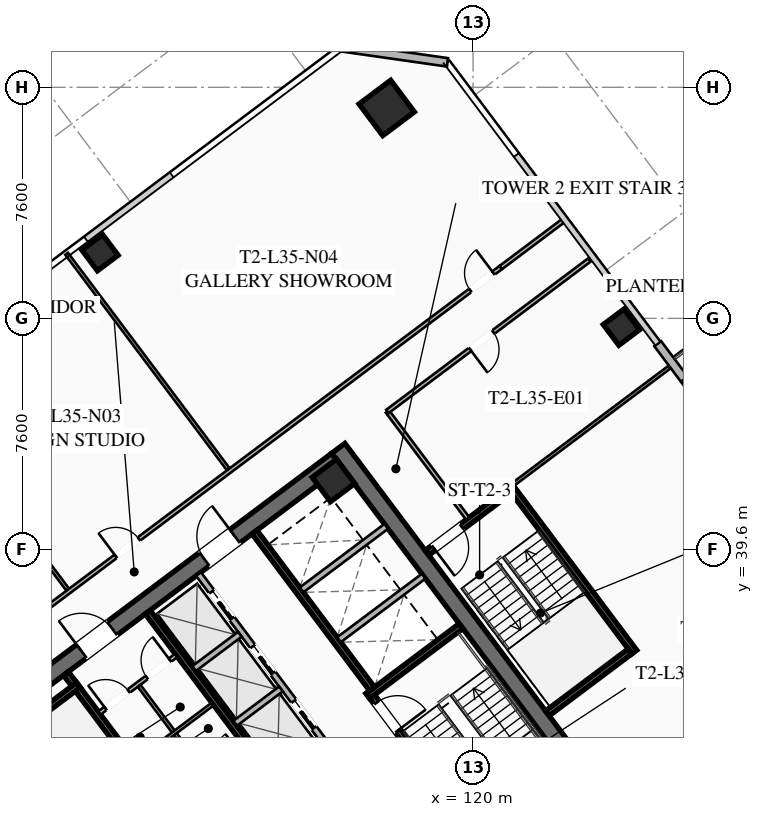
"""IFC4 building model, lengths in metres.
Left out: names, types, materials, properties, quantities, classifications, styles, units other than length and angle.
Written with IfcOpenShell. Run it as: python <this file> out.ifc"""

import sys

from ifc_helpers import new_model, si_unit, direction, frame, frame_2d, origin, origin_2d, place, context, subcontext, project, spatial, rectangle, hollow_rectangle, extrude, element, fill, save


model = new_model("IFC4")
c1 = context("Model", 3, precision=1e-05, world=origin(), true_north=direction((0.0, 1.0)))
c2 = subcontext(c1, "Body", "Model", "MODEL_VIEW")
j1 = project(units=[si_unit("LENGTHUNIT", "METRE"), si_unit("PLANEANGLEUNIT", "RADIAN")], contexts=[c1])
p1 = place(None, origin())
s1 = spatial("IfcSite", under=j1, at=p1, CompositionType="ELEMENT")
p2 = place(p1, origin())
s2 = spatial("IfcBuilding", under=s1, at=p2, CompositionType="ELEMENT")
p3 = place(p2, frame((0.0, 0.0, 132.15)))
s3 = spatial("IfcBuildingStorey", under=s2, at=p3, CompositionType="ELEMENT", Elevation=132.15)
for number, where, z_axis, x_axis in (
    (1, (112.436, 21.077, 0.0), (0.0, 0.0, 1.0), (-0.6, 0.8, 0.0)),
    (2, (115.564, 42.923, 0.0), (0.0, 0.0, 1.0), (0.6, -0.8, 0.0)),
):
    element("IfcWall", number, at=place(p3, frame(where, z_axis=z_axis, x_axis=x_axis)), inside=s3, PredefinedType="SHEAR", context=c2, shape_type="SweptSolid", body=[
        extrude(rectangle(XDim=15.6, YDim=0.55, at=frame_2d((7.8, 0.0))), origin(), (0.0, 0.0, 1.0), 3.55),
    ])
p4 = place(p3, frame((103.461, 33.502, 0.0), z_axis=(0.0, 0.0, 1.0), x_axis=(0.799998054672, 0.600002593761, 0.0)))
e3 = element("IfcWall", 3, at=p4, inside=s3, PredefinedType="SHEAR", context=c2, shape_type="SweptSolid", body=[
    extrude(rectangle(XDim=15.06, YDim=0.55, at=frame_2d((7.53, 0.0))), origin(), (0.0, 0.0, 1.0), 3.55),
])
p5 = place(p4, frame((4.58, 0.0, 0.0)))
e4 = element("IfcOpeningElement", 4, at=p5, cuts=e3, PredefinedType="OPENING", context=c2, shape_type="SweptSolid", body=[
    extrude(rectangle(XDim=1.25, YDim=2.25, at=frame_2d((0.625, 1.125))), frame((0.0, 0.285, 0.0), z_axis=(0.0, -1.0, 0.0), x_axis=(1.0, 0.0, 0.0)), (0.0, 0.0, 1.0), 0.57),
])
p6 = place(p4, frame((9.63, 0.0, 0.0)))
e5 = element("IfcOpeningElement", 5, at=p6, cuts=e3, PredefinedType="OPENING", context=c2, shape_type="SweptSolid", body=[
    extrude(rectangle(XDim=1.25, YDim=2.25, at=frame_2d((0.625, 1.125))), frame((0.0, 0.285, 0.0), z_axis=(0.0, -1.0, 0.0), x_axis=(1.0, 0.0, 0.0)), (0.0, 0.0, 1.0), 0.57),
])
p7 = place(p3, frame((115.41, 41.87, 0.0), z_axis=(0.0, 0.0, 1.0), x_axis=(0.799999996291, 0.600000004945, 0.0)))
e6 = element("IfcColumn", 6, at=p7, inside=s3, PredefinedType="COLUMN", context=c2, shape_type="SweptSolid", body=[
    extrude(hollow_rectangle(XDim=1.0, YDim=1.0, WallThickness=0.04, at=origin_2d()), origin(), (0.0, 0.0, 1.0), 3.37),
])
p8 = place(p3, frame((117.16, 54.12, 0.0), z_axis=(0.0, 0.0, 1.0), x_axis=(0.799999996291, 0.600000004945, 0.0)))
e7 = element("IfcColumn", 7, at=p8, inside=s3, PredefinedType="COLUMN", context=c2, shape_type="SweptSolid", body=[
    extrude(hollow_rectangle(XDim=1.3, YDim=1.3, WallThickness=0.05, at=origin_2d()), origin(), (0.0, 0.0, 1.0), 3.37),
])
for number, where, z_axis, x_axis in (
    (8, (124.88, 46.91, 0.0), (0.0, 0.0, 1.0), (0.8, 0.6, 0.0)),
    (9, (107.73, 49.36, 0.0), (0.0, 0.0, 1.0), (0.8, 0.6, 0.0)),
):
    element("IfcColumn", number, at=place(p3, frame(where, z_axis=z_axis, x_axis=x_axis)), inside=s3, PredefinedType="COLUMN", context=c2, shape_type="SweptSolid", body=[
        extrude(hollow_rectangle(XDim=0.85, YDim=0.85, WallThickness=0.035, at=origin_2d()), origin(), (0.0, 0.0, 1.0), 3.37),
    ])
p9 = place(p3, frame((126.074, 46.368, 0.0), z_axis=(0.0, 0.0, 1.0), x_axis=(0.600018382406, -0.799986212866, 0.0)))
e10 = element("IfcWall", 10, at=p9, inside=s3, PredefinedType="SOLIDWALL", context=c2, shape_type="SweptSolid", body=[
    extrude(rectangle(XDim=8.5, YDim=0.28, at=frame_2d((4.25, 0.0))), origin(), (0.0, 0.0, 1.0), 3.37),
])
p10 = place(p9, frame((3.6, 0.0, 0.0)))
e11 = element("IfcOpeningElement", 11, at=p10, cuts=e10, PredefinedType="OPENING", context=c2, shape_type="SweptSolid", body=[
    extrude(rectangle(XDim=1.3, YDim=2.15, at=frame_2d((0.65, 1.075))), frame((0.0, 0.15, 0.0), z_axis=(0.0, -1.0, 0.0), x_axis=(1.0, 0.0, 0.0)), (0.0, 0.0, 1.0), 0.3),
])
p11 = place(p9, frame((1.46, 0.0, 0.85)))
e12 = element("IfcOpeningElement", 12, at=p11, cuts=e10, PredefinedType="OPENING", context=c2, shape_type="SweptSolid", body=[
    extrude(rectangle(XDim=1.8, YDim=1.92, at=frame_2d((0.9, 0.96))), frame((0.0, 0.15, 0.0), z_axis=(0.0, -1.0, 0.0), x_axis=(1.0, 0.0, 0.0)), (0.0, 0.0, 1.0), 0.3),
])
p12 = place(p3, frame((115.66, 56.12, 0.0), z_axis=(0.0, 0.0, 1.0), x_axis=(0.989949493661, -0.141421356237, 0.0)))
e13 = element("IfcWall", 13, at=p12, inside=s3, PredefinedType="SOLIDWALL", context=c2, shape_type="SweptSolid", body=[
    extrude(rectangle(XDim=3.536, YDim=0.28, at=frame_2d((1.768, 0.0))), origin(), (0.0, 0.0, 1.0), 3.37),
])
p13 = place(p3, frame((111.44, 29.08, 0.0), z_axis=(0.0, 0.0, 1.0), x_axis=(-0.59999029481, 0.8000072788, 0.0)))
e14 = element("IfcWall", 14, at=p13, inside=s3, PredefinedType="SHEAR", context=c2, shape_type="SweptSolid", body=[
    extrude(rectangle(XDim=8.05, YDim=0.2, at=frame_2d((4.025, 0.0))), origin(), (0.0, 0.0, 1.0), 3.37),
])
p14 = place(p13, frame((0.45, 0.0, 0.0)))
e15 = element("IfcOpeningElement", 15, at=p14, cuts=e14, PredefinedType="OPENING", context=c2, shape_type="SweptSolid", body=[
    extrude(rectangle(XDim=1.15, YDim=2.2, at=frame_2d((0.575, 1.1))), frame((0.0, 0.11, 0.0), z_axis=(0.0, -1.0, 0.0), x_axis=(1.0, 0.0, 0.0)), (0.0, 0.0, 1.0), 0.22),
])
p15 = place(p3, frame((103.956, 32.842, 0.0), z_axis=(0.0, 0.0, 1.0), x_axis=(0.800015298837, 0.599979601008, 0.0)))
e16 = element("IfcWall", 16, at=p15, inside=s3, PredefinedType="SHEAR", context=c2, shape_type="SweptSolid", body=[
    extrude(rectangle(XDim=3.83, YDim=0.2, at=frame_2d((1.915, 0.0))), origin(), (0.0, 0.0, 1.0), 3.37),
])
p16 = place(p3, frame((116.56, 34.92, 0.0), z_axis=(0.0, 0.0, 1.0), x_axis=(0.59999029481, -0.8000072788, 0.0)))
e17 = element("IfcWall", 17, at=p16, inside=s3, PredefinedType="SHEAR", context=c2, shape_type="SweptSolid", body=[
    extrude(rectangle(XDim=8.05, YDim=0.2, at=frame_2d((4.025, 0.0))), origin(), (0.0, 0.0, 1.0), 3.37),
])
p17 = place(p16, frame((0.45, 0.0, 0.0)))
e18 = element("IfcOpeningElement", 18, at=p17, cuts=e17, PredefinedType="OPENING", context=c2, shape_type="SweptSolid", body=[
    extrude(rectangle(XDim=1.15, YDim=2.2, at=frame_2d((0.575, 1.1))), frame((0.0, 0.11, 0.0), z_axis=(0.0, -1.0, 0.0), x_axis=(1.0, 0.0, 0.0)), (0.0, 0.0, 1.0), 0.22),
])
p18 = place(p3, frame((116.54, 34.78, 0.0), z_axis=(0.0, 0.0, 1.0), x_axis=(0.800015298837, 0.599979601008, 0.0)))
e19 = element("IfcWall", 19, at=p18, inside=s3, PredefinedType="SHEAR", context=c2, shape_type="SweptSolid", body=[
    extrude(rectangle(XDim=3.83, YDim=0.2, at=frame_2d((1.915, 0.0))), origin(), (0.0, 0.0, 1.0), 3.37),
])
p19 = place(p3, frame((117.998, 25.936, 0.0), z_axis=(0.0, 0.0, 1.0), x_axis=(-0.600002693989, 0.799997979501, 0.0)))
e20 = element("IfcWall", 20, at=p19, inside=s3, PredefinedType="SHEAR", context=c2, shape_type="SweptSolid", body=[
    extrude(rectangle(XDim=14.5, YDim=0.2, at=frame_2d((7.25, 0.0))), origin(), (0.0, 0.0, 1.0), 3.37),
])
p20 = place(p3, frame((112.81, 40.17, 0.0), z_axis=(0.0, 0.0, 1.0), x_axis=(0.599993943644, -0.800004542231, 0.0)))
e21 = element("IfcWall", 21, at=p20, inside=s3, PredefinedType="SHEAR", context=c2, shape_type="SweptSolid", body=[
    extrude(rectangle(XDim=6.45, YDim=0.2, at=frame_2d((3.225, 0.0))), origin(), (0.0, 0.0, 1.0), 3.37),
])
for number, where, z_axis, x_axis in (
    (22, (115.59, 36.63, 0.0), (0.0, 0.0, 1.0), (0.8, 0.6, 0.0)),
    (23, (114.36, 38.27, 0.0), (0.0, 0.0, 1.0), (0.8, 0.6, 0.0)),
):
    element("IfcWall", number, at=place(p3, frame(where, z_axis=z_axis, x_axis=x_axis)), inside=s3, PredefinedType="SOLIDWALL", context=c2, shape_type="SweptSolid", body=[
        extrude(rectangle(XDim=3.48, YDim=0.2, at=frame_2d((1.74, 0.0))), origin(), (0.0, 0.0, 1.0), 3.37),
    ])
p21 = place(p3, frame((107.71, 34.22, 0.0), z_axis=(0.0, 0.0, 1.0), x_axis=(0.799981399002, 0.60002480053, 0.0)))
e24 = element("IfcWall", 24, at=p21, inside=s3, PredefinedType="PARTITIONING", context=c2, shape_type="SweptSolid", body=[
    extrude(rectangle(XDim=3.15, YDim=0.135, at=frame_2d((1.575, 0.0))), origin(), (0.0, 0.0, 1.0), 2.723),
])
p22 = place(p21, frame((0.25, 0.0, 0.0)))
e25 = element("IfcOpeningElement", 25, at=p22, cuts=e24, PredefinedType="OPENING", context=c2, shape_type="SweptSolid", body=[
    extrude(rectangle(XDim=0.95, YDim=2.05, at=frame_2d((0.475, 1.025))), frame((0.0, 0.077, 0.0), z_axis=(0.0, -1.0, 0.0), x_axis=(1.0, 0.0, 0.0)), (0.0, 0.0, 1.0), 0.155),
])
p23 = place(p21, frame((1.95, 0.0, 0.0)))
e26 = element("IfcOpeningElement", 26, at=p23, cuts=e24, PredefinedType="OPENING", context=c2, shape_type="SweptSolid", body=[
    extrude(rectangle(XDim=0.95, YDim=2.05, at=frame_2d((0.475, 1.025))), frame((0.0, 0.077, 0.0), z_axis=(0.0, -1.0, 0.0), x_axis=(1.0, 0.0, 0.0)), (0.0, 0.0, 1.0), 0.155),
])
p24 = place(p3, frame((111.296, 32.072, 0.0), z_axis=(0.0, 0.0, 1.0), x_axis=(-0.59995887973, 0.800030838552, 0.0)))
e27 = element("IfcWall", 27, at=p24, inside=s3, PredefinedType="PARTITIONING", context=c2, shape_type="SweptSolid", body=[
    extrude(rectangle(XDim=3.8, YDim=0.11, at=frame_2d((1.9, 0.0))), origin(), (0.0, 0.0, 1.0), 2.723),
])
p25 = place(p3, frame((108.91, 32.62, 0.0), z_axis=(0.0, 0.0, 1.0), x_axis=(0.800018601094, 0.59997519774, 0.0)))
e28 = element("IfcWall", 28, at=p25, inside=s3, PredefinedType="PARTITIONING", context=c2, shape_type="SweptSolid", body=[
    extrude(rectangle(XDim=3.15, YDim=0.11, at=frame_2d((1.575, 0.0))), origin(), (0.0, 0.0, 1.0), 2.723),
])
p26 = place(p3, frame((115.11, 33.27, 0.0), z_axis=(0.0, 0.0, 1.0), x_axis=(-0.600011322243, 0.799991508192, 0.0)))
e29 = element("IfcWall", 29, at=p26, inside=s3, PredefinedType="SOLIDWALL", context=c2, shape_type="SweptSolid", body=[
    extrude(rectangle(XDim=6.9, YDim=0.2, at=frame_2d((3.45, 0.0))), origin(), (0.0, 0.0, 1.0), 3.37),
])
p27 = place(p26, frame((0.575, 0.0, 0.0)))
e30 = element("IfcOpeningElement", 30, at=p27, cuts=e29, PredefinedType="OPENING", context=c2, shape_type="SweptSolid", body=[
    extrude(rectangle(XDim=1.1, YDim=2.2, at=frame_2d((0.55, 1.1))), frame((0.0, 0.11, 0.0), z_axis=(0.0, -1.0, 0.0), x_axis=(1.0, 0.0, 0.0)), (0.0, 0.0, 1.0), 0.22),
])
p28 = place(p26, frame((2.825, 0.0, 0.0)))
e31 = element("IfcOpeningElement", 31, at=p28, cuts=e29, PredefinedType="OPENING", context=c2, shape_type="SweptSolid", body=[
    extrude(rectangle(XDim=1.1, YDim=2.2, at=frame_2d((0.55, 1.1))), frame((0.0, 0.11, 0.0), z_axis=(0.0, -1.0, 0.0), x_axis=(1.0, 0.0, 0.0)), (0.0, 0.0, 1.0), 0.22),
])
p29 = place(p26, frame((5.075, 0.0, 0.0)))
e32 = element("IfcOpeningElement", 32, at=p29, cuts=e29, PredefinedType="OPENING", context=c2, shape_type="SweptSolid", body=[
    extrude(rectangle(XDim=1.1, YDim=2.2, at=frame_2d((0.55, 1.1))), frame((0.0, 0.11, 0.0), z_axis=(0.0, -1.0, 0.0), x_axis=(1.0, 0.0, 0.0)), (0.0, 0.0, 1.0), 0.22),
])
p30 = place(p3, frame((112.176, 33.882, 0.0), z_axis=(0.0, 0.0, 1.0), x_axis=(0.8, 0.6, 0.0)))
e33 = element("IfcWall", 33, at=p30, inside=s3, PredefinedType="SOLIDWALL", context=c2, shape_type="SweptSolid", body=[
    extrude(rectangle(XDim=1.88, YDim=0.2, at=frame_2d((0.94, 0.0))), origin(), (0.0, 0.0, 1.0), 3.37),
])
p31 = place(p3, frame((110.826, 35.682, 0.0), z_axis=(0.0, 0.0, 1.0), x_axis=(0.799984418148, 0.600020775241, 0.0)))
e34 = element("IfcWall", 34, at=p31, inside=s3, PredefinedType="SOLIDWALL", context=c2, shape_type="SweptSolid", body=[
    extrude(rectangle(XDim=1.88, YDim=0.2, at=frame_2d((0.94, 0.0))), origin(), (0.0, 0.0, 1.0), 3.37),
])
p32 = place(p3, frame((125.304, 36.228, 0.0), z_axis=(0.0, 0.0, 1.0), x_axis=(-0.59998851072, 0.800008616831, 0.0)))
e35 = element("IfcWall", 35, at=p32, inside=s3, PredefinedType="SHEAR", context=c2, shape_type="SweptSolid", body=[
    extrude(rectangle(XDim=6.8, YDim=0.2, at=frame_2d((3.4, 0.0))), origin(), (0.0, 0.0, 1.0), 3.37),
])
p33 = place(p3, frame((121.204, 41.528, 0.0), z_axis=(0.0, 0.0, 1.0), x_axis=(-0.800017232136, -0.599977023131, 0.0)))
e36 = element("IfcWall", 36, at=p33, inside=s3, PredefinedType="SHEAR", context=c2, shape_type="SweptSolid", body=[
    extrude(rectangle(XDim=3.4, YDim=0.2, at=frame_2d((1.7, 0.0))), origin(), (0.0, 0.0, 1.0), 3.37),
])
p34 = place(p33, frame((1.975, 0.0, 0.0)))
e37 = element("IfcOpeningElement", 37, at=p34, cuts=e36, PredefinedType="OPENING", context=c2, shape_type="SweptSolid", body=[
    extrude(rectangle(XDim=1.15, YDim=2.2, at=frame_2d((0.575, 1.1))), frame((0.0, 0.11, 0.0), z_axis=(0.0, -1.0, 0.0), x_axis=(1.0, 0.0, 0.0)), (0.0, 0.0, 1.0), 0.22),
])
p35 = place(p3, frame((122.444, 34.208, 0.0), z_axis=(0.0, 0.0, 1.0), x_axis=(0.79999138319, 0.600011488909, 0.0)))
e38 = element("IfcWall", 38, at=p35, inside=s3, PredefinedType="SHEAR", context=c2, shape_type="SweptSolid", body=[
    extrude(rectangle(XDim=3.4, YDim=0.2, at=frame_2d((1.7, 0.0))), origin(), (0.0, 0.0, 1.0), 3.37),
])
p36 = place(p3, frame((119.824, 40.618, 0.0), z_axis=(0.0, 0.0, 1.0), x_axis=(-0.599982243973, 0.800013316712, 0.0)))
e39 = element("IfcWall", 39, at=p36, inside=s3, PredefinedType="PARTITIONING", context=c2, shape_type="SweptSolid", body=[
    extrude(rectangle(XDim=4.4, YDim=0.135, at=frame_2d((2.2, 0.0))), origin(), (0.0, 0.0, 1.0), 2.723),
])
p37 = place(p3, frame((95.87, 30.09, 0.0), z_axis=(0.0, 0.0, 1.0), x_axis=(0.799997191971, 0.600003744021, 0.0)))
e40 = element("IfcWall", 40, at=p37, inside=s3, PredefinedType="PARTITIONING", context=c2, shape_type="SweptSolid", body=[
    extrude(rectangle(XDim=31.3, YDim=0.135, at=frame_2d((15.65, 0.0))), origin(), (0.0, 0.0, 1.0), 2.723),
])
p38 = place(p37, frame((0.3, 0.0, 0.0)))
e41 = element("IfcOpeningElement", 41, at=p38, cuts=e40, PredefinedType="OPENING", context=c2, shape_type="SweptSolid", body=[
    extrude(rectangle(XDim=0.95, YDim=2.05, at=frame_2d((0.475, 1.025))), frame((0.0, 0.077, 0.0), z_axis=(0.0, -1.0, 0.0), x_axis=(1.0, 0.0, 0.0)), (0.0, 0.0, 1.0), 0.155),
])
p39 = place(p37, frame((11.202, 0.0, 0.0)))
e42 = element("IfcOpeningElement", 42, at=p39, cuts=e40, PredefinedType="OPENING", context=c2, shape_type="SweptSolid", body=[
    extrude(rectangle(XDim=0.95, YDim=2.05, at=frame_2d((0.475, 1.025))), frame((0.0, 0.077, 0.0), z_axis=(0.0, -1.0, 0.0), x_axis=(1.0, 0.0, 0.0)), (0.0, 0.0, 1.0), 0.155),
])
p40 = place(p37, frame((15.474, 0.0, 0.0)))
e43 = element("IfcOpeningElement", 43, at=p40, cuts=e40, PredefinedType="OPENING", context=c2, shape_type="SweptSolid", body=[
    extrude(rectangle(XDim=0.95, YDim=2.05, at=frame_2d((0.475, 1.025))), frame((0.0, 0.077, 0.0), z_axis=(0.0, -1.0, 0.0), x_axis=(1.0, 0.0, 0.0)), (0.0, 0.0, 1.0), 0.155),
])
p41 = place(p37, frame((30.05, 0.0, 0.0)))
e44 = element("IfcOpeningElement", 44, at=p41, cuts=e40, PredefinedType="OPENING", context=c2, shape_type="SweptSolid", body=[
    extrude(rectangle(XDim=0.95, YDim=2.05, at=frame_2d((0.475, 1.025))), frame((0.0, 0.077, 0.0), z_axis=(0.0, -1.0, 0.0), x_axis=(1.0, 0.0, 0.0)), (0.0, 0.0, 1.0), 0.155),
])
p42 = place(p3, frame((120.91, 48.87, 0.0), z_axis=(0.0, 0.0, 1.0), x_axis=(0.80002227902, 0.599970293491, 0.0)))
e45 = element("IfcWall", 45, at=p42, inside=s3, PredefinedType="PARTITIONING", context=c2, shape_type="SweptSolid", body=[
    extrude(rectangle(XDim=2.63, YDim=0.135, at=frame_2d((1.315, 0.0))), origin(), (0.0, 0.0, 1.0), 2.723),
])
p43 = place(p3, frame((106.662, 38.284, 0.0), z_axis=(0.0, 0.0, 1.0), x_axis=(-0.6, 0.8, 0.0)))
e46 = element("IfcWall", 46, at=p43, inside=s3, PredefinedType="PARTITIONING", context=c2, shape_type="SweptSolid", body=[
    extrude(rectangle(XDim=8.85, YDim=0.11, at=frame_2d((4.425, 0.0))), origin(), (0.0, 0.0, 1.0), 2.723),
])
p44 = place(p3, frame((111.942, 42.244, 0.0), z_axis=(0.0, 0.0, 1.0), x_axis=(-0.599982344389, 0.800013241404, 0.0)))
e47 = element("IfcWall", 47, at=p44, inside=s3, PredefinedType="PARTITIONING", context=c2, shape_type="SweptSolid", body=[
    extrude(rectangle(XDim=8.85, YDim=0.11, at=frame_2d((4.425, 0.0))), origin(), (0.0, 0.0, 1.0), 2.723),
])
p45 = place(p3, frame((123.824, 49.118, 0.0), z_axis=(0.0, 0.0, 1.0), x_axis=(-0.799996470201, -0.60000470637, 0.0)))
e48 = element("IfcWall", 48, at=p45, inside=s3, PredefinedType="PARTITIONING", context=c2, shape_type="SweptSolid", body=[
    extrude(rectangle(XDim=8.3, YDim=0.135, at=frame_2d((4.15, 0.0))), origin(), (0.0, 0.0, 1.0), 2.723),
])
p46 = place(p45, frame((3.95, 0.0, 0.0)))
e49 = element("IfcOpeningElement", 49, at=p46, cuts=e48, PredefinedType="OPENING", context=c2, shape_type="SweptSolid", body=[
    extrude(rectangle(XDim=0.95, YDim=2.05, at=frame_2d((0.475, 1.025))), frame((0.0, 0.077, 0.0), z_axis=(0.0, -1.0, 0.0), x_axis=(1.0, 0.0, 0.0)), (0.0, 0.0, 1.0), 0.155),
])
p47 = place(p3, frame((125.208, 30.656, 0.0), z_axis=(0.0, 0.0, 1.0), x_axis=(0.800005876956, 0.599992163979, 0.0)))
e50 = element("IfcWall", 50, at=p47, inside=s3, PredefinedType="PARTITIONING", context=c2, shape_type="SweptSolid", body=[
    extrude(rectangle(XDim=9.97, YDim=0.135, at=frame_2d((4.985, 0.0))), origin(), (0.0, 0.0, 1.0), 2.723),
])
p48 = place(p47, frame((2.045, 0.0, 0.0)))
e51 = element("IfcOpeningElement", 51, at=p48, cuts=e50, PredefinedType="OPENING", context=c2, shape_type="SweptSolid", body=[
    extrude(rectangle(XDim=0.95, YDim=2.05, at=frame_2d((0.475, 1.025))), frame((0.0, 0.077, 0.0), z_axis=(0.0, -1.0, 0.0), x_axis=(1.0, 0.0, 0.0)), (0.0, 0.0, 1.0), 0.155),
])
p49 = place(p3, frame((126.464, 45.598, 0.0), z_axis=(0.0, 0.0, 1.0), x_axis=(-0.8000181681, -0.599975775102, 0.0)))
e52 = element("IfcWall", 52, at=p49, inside=s3, PredefinedType="PARTITIONING", context=c2, shape_type="SweptSolid", body=[
    extrude(rectangle(XDim=6.45, YDim=0.11, at=frame_2d((3.225, 0.0))), origin(), (0.0, 0.0, 1.0), 2.723),
])
p50 = place(p5, origin())
e53 = element("IfcDoor", 53, at=p50, inside=s3, OperationType="SINGLE_SWING_LEFT", PredefinedType="DOOR", context=c2, shape_type="SweptSolid", body=[
    extrude(rectangle(XDim=1.25, YDim=2.25, at=frame_2d((0.625, 1.125))), frame((0.0, 0.025, 0.0), z_axis=(0.0, -1.0, 0.0), x_axis=(1.0, 0.0, 0.0)), (0.0, 0.0, 1.0), 0.05),
])
fill(e4, e53)
p51 = place(p6, origin())
e54 = element("IfcDoor", 54, at=p51, inside=s3, OperationType="SINGLE_SWING_RIGHT", PredefinedType="DOOR", context=c2, shape_type="SweptSolid", body=[
    extrude(rectangle(XDim=1.25, YDim=2.25, at=frame_2d((0.625, 1.125))), frame((0.0, 0.025, 0.0), z_axis=(0.0, -1.0, 0.0), x_axis=(1.0, 0.0, 0.0)), (0.0, 0.0, 1.0), 0.05),
])
fill(e5, e54)
p52 = place(p17, origin())
e55 = element("IfcDoor", 55, at=p52, inside=s3, OperationType="SINGLE_SWING_RIGHT", PredefinedType="DOOR", context=c2, shape_type="SweptSolid", body=[
    extrude(rectangle(XDim=1.15, YDim=2.2, at=frame_2d((0.575, 1.1))), frame((0.0, 0.025, 0.0), z_axis=(0.0, -1.0, 0.0), x_axis=(1.0, 0.0, 0.0)), (0.0, 0.0, 1.0), 0.05),
])
fill(e18, e55)
p53 = place(p22, origin())
e56 = element("IfcDoor", 56, at=p53, inside=s3, OperationType="SINGLE_SWING_LEFT", PredefinedType="DOOR", context=c2, shape_type="SweptSolid", body=[
    extrude(rectangle(XDim=0.95, YDim=2.05, at=frame_2d((0.475, 1.025))), frame((0.0, 0.025, 0.0), z_axis=(0.0, -1.0, 0.0), x_axis=(1.0, 0.0, 0.0)), (0.0, 0.0, 1.0), 0.05),
])
fill(e25, e56)
p54 = place(p23, origin())
e57 = element("IfcDoor", 57, at=p54, inside=s3, OperationType="SINGLE_SWING_RIGHT", PredefinedType="DOOR", context=c2, shape_type="SweptSolid", body=[
    extrude(rectangle(XDim=0.95, YDim=2.05, at=frame_2d((0.475, 1.025))), frame((0.0, 0.025, 0.0), z_axis=(0.0, -1.0, 0.0), x_axis=(1.0, 0.0, 0.0)), (0.0, 0.0, 1.0), 0.05),
])
fill(e26, e57)
p55 = place(p34, origin())
e58 = element("IfcDoor", 58, at=p55, inside=s3, OperationType="SINGLE_SWING_RIGHT", PredefinedType="DOOR", context=c2, shape_type="SweptSolid", body=[
    extrude(rectangle(XDim=1.15, YDim=2.2, at=frame_2d((0.575, 1.1))), frame((0.0, 0.025, 0.0), z_axis=(0.0, -1.0, 0.0), x_axis=(1.0, 0.0, 0.0)), (0.0, 0.0, 1.0), 0.05),
])
fill(e37, e58)
p56 = place(p40, origin())
e59 = element("IfcDoor", 59, at=p56, inside=s3, OperationType="SINGLE_SWING_LEFT", PredefinedType="DOOR", context=c2, shape_type="SweptSolid", body=[
    extrude(rectangle(XDim=0.95, YDim=2.05, at=frame_2d((0.475, 1.025))), frame((0.0, 0.025, 0.0), z_axis=(0.0, -1.0, 0.0), x_axis=(1.0, 0.0, 0.0)), (0.0, 0.0, 1.0), 0.05),
])
fill(e43, e59)
p57 = place(p41, origin())
e60 = element("IfcDoor", 60, at=p57, inside=s3, OperationType="SINGLE_SWING_RIGHT", PredefinedType="DOOR", context=c2, shape_type="SweptSolid", body=[
    extrude(rectangle(XDim=0.95, YDim=2.05, at=frame_2d((0.475, 1.025))), frame((0.0, 0.025, 0.0), z_axis=(0.0, -1.0, 0.0), x_axis=(1.0, 0.0, 0.0)), (0.0, 0.0, 1.0), 0.05),
])
fill(e44, e60)
p58 = place(p46, origin())
e61 = element("IfcDoor", 61, at=p58, inside=s3, OperationType="SINGLE_SWING_RIGHT", PredefinedType="DOOR", context=c2, shape_type="SweptSolid", body=[
    extrude(rectangle(XDim=0.95, YDim=2.05, at=frame_2d((0.475, 1.025))), frame((0.0, 0.025, 0.0), z_axis=(0.0, -1.0, 0.0), x_axis=(1.0, 0.0, 0.0)), (0.0, 0.0, 1.0), 0.05),
])
fill(e49, e61)
p59 = place(p27, origin())
e62 = element("IfcDoor", 62, at=p59, inside=s3, OperationType="SLIDING_TO_LEFT", PredefinedType="DOOR", context=c2, shape_type="SweptSolid", body=[
    extrude(rectangle(XDim=1.1, YDim=2.2, at=frame_2d((0.55, 1.1))), frame((0.0, 0.025, 0.0), z_axis=(0.0, -1.0, 0.0), x_axis=(1.0, 0.0, 0.0)), (0.0, 0.0, 1.0), 0.05),
])
fill(e30, e62)
p60 = place(p28, origin())
e63 = element("IfcDoor", 63, at=p60, inside=s3, OperationType="SLIDING_TO_LEFT", PredefinedType="DOOR", context=c2, shape_type="SweptSolid", body=[
    extrude(rectangle(XDim=1.1, YDim=2.2, at=frame_2d((0.55, 1.1))), frame((0.0, 0.025, 0.0), z_axis=(0.0, -1.0, 0.0), x_axis=(1.0, 0.0, 0.0)), (0.0, 0.0, 1.0), 0.05),
])
fill(e31, e63)
p61 = place(p29, origin())
e64 = element("IfcDoor", 64, at=p61, inside=s3, OperationType="SLIDING_TO_LEFT", PredefinedType="DOOR", context=c2, shape_type="SweptSolid", body=[
    extrude(rectangle(XDim=1.1, YDim=2.2, at=frame_2d((0.55, 1.1))), frame((0.0, 0.025, 0.0), z_axis=(0.0, -1.0, 0.0), x_axis=(1.0, 0.0, 0.0)), (0.0, 0.0, 1.0), 0.05),
])
fill(e32, e64)
save(model, sys.argv[1])
